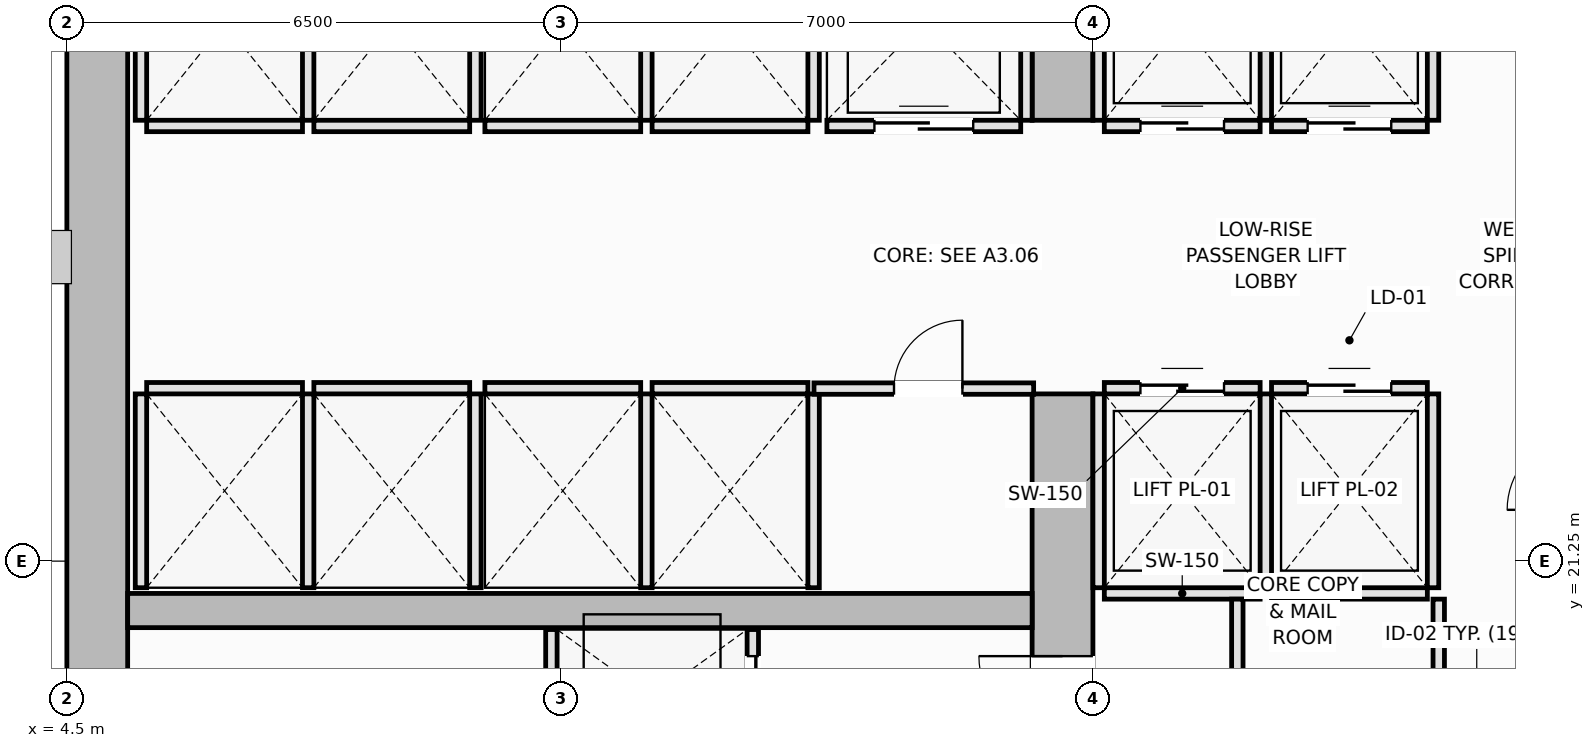
"""IFC4 building model, lengths in metres.
Left out: names, types, materials, properties, quantities, classifications, styles, units other than length and angle.
Written with IfcOpenShell. Run it as: python <this file> out.ifc"""

import sys

from ifc_helpers import new_model, si_unit, direction, frame, frame_2d, origin, place, context, subcontext, project, spatial, rectangle, extrude, element, fill, save


model = new_model("IFC4")
c1 = context("Model", 3, precision=1e-05, world=origin(), true_north=direction((0.0, 1.0)))
c2 = subcontext(c1, "Body", "Model", "MODEL_VIEW")
j1 = project(units=[si_unit("LENGTHUNIT", "METRE"), si_unit("PLANEANGLEUNIT", "RADIAN")], contexts=[c1])
p1 = place(None, origin())
s1 = spatial("IfcSite", under=j1, at=p1, CompositionType="ELEMENT")
p2 = place(p1, origin())
s2 = spatial("IfcBuilding", under=s1, at=p2, CompositionType="ELEMENT")
p3 = place(p2, frame((0.0, 0.0, 64.65)))
s3 = spatial("IfcBuildingStorey", under=s2, at=p3, CompositionType="ELEMENT", Elevation=64.65)
p4 = place(p3, frame((4.9, 14.8, 0.0), z_axis=(0.0, 0.0, 1.0), x_axis=(0.0, 1.0, 0.0)))
e1 = element("IfcWall", 1, at=p4, inside=s3, PredefinedType="SHEAR", context=c2, shape_type="SweptSolid", body=[
    extrude(rectangle(XDim=20.9, YDim=0.8, at=frame_2d((10.45, 0.0))), origin(), (0.0, 0.0, 1.0), 3.55),
])
p5 = place(p3, frame((17.6, 14.8, 0.0), z_axis=(0.0, 0.0, 1.0), x_axis=(0.0, 1.0, 0.0)))
e2 = element("IfcWall", 2, at=p5, inside=s3, PredefinedType="SHEAR", context=c2, shape_type="SweptSolid", body=[
    extrude(rectangle(XDim=8.65, YDim=0.8, at=frame_2d((4.325, 0.0))), origin(), (0.0, 0.0, 1.0), 3.55),
])
p6 = place(p5, frame((4.1, 0.0, 0.0)))
e3 = element("IfcOpeningElement", 3, at=p6, cuts=e2, PredefinedType="OPENING", context=c2, shape_type="SweptSolid", body=[
    extrude(rectangle(XDim=1.1, YDim=2.15, at=frame_2d((0.55, 1.075))), frame((0.0, 0.41, 0.0), z_axis=(0.0, -1.0, 0.0), x_axis=(1.0, 0.0, 0.0)), (0.0, 0.0, 1.0), 0.82),
])
p7 = place(p3, frame((17.6, 27.05, 0.0), z_axis=(0.0, 0.0, 1.0), x_axis=(0.0, 1.0, 0.0)))
e4 = element("IfcWall", 4, at=p7, inside=s3, PredefinedType="SHEAR", context=c2, shape_type="SweptSolid", body=[
    extrude(rectangle(XDim=8.65, YDim=0.8, at=frame_2d((4.325, 0.0))), origin(), (0.0, 0.0, 1.0), 3.55),
])
p8 = place(p7, frame((3.45, 0.0, 0.0)))
e5 = element("IfcOpeningElement", 5, at=p8, cuts=e4, PredefinedType="OPENING", context=c2, shape_type="SweptSolid", body=[
    extrude(rectangle(XDim=1.1, YDim=2.15, at=frame_2d((0.55, 1.075))), frame((0.0, 0.41, 0.0), z_axis=(0.0, -1.0, 0.0), x_axis=(1.0, 0.0, 0.0)), (0.0, 0.0, 1.0), 0.82),
])
p9 = place(p3, frame((5.3, 20.6, 0.0), z_axis=(0.0, 0.0, 1.0), x_axis=(1.0, 0.0, 0.0)))
e6 = element("IfcWall", 6, at=p9, inside=s3, PredefinedType="SHEAR", context=c2, shape_type="SweptSolid", body=[
    extrude(rectangle(XDim=11.9, YDim=0.45, at=frame_2d((5.95, 0.0))), origin(), (0.0, 0.0, 1.0), 3.55),
])
p10 = place(p3, frame((18.15, 20.825, 0.0), z_axis=(0.0, 0.0, 1.0), x_axis=(1.0, 0.0, 0.0)))
e7 = element("IfcWall", 7, at=p10, inside=s3, PredefinedType="PARTITIONING", context=c2, shape_type="SweptSolid", body=[
    extrude(rectangle(XDim=2.05, YDim=0.15, at=frame_2d((1.025, 0.0))), origin(), (0.0, 0.0, 1.0), 3.37),
])
p11 = place(p3, frame((18.15, 23.525, 0.0), z_axis=(0.0, 0.0, 1.0), x_axis=(1.0, 0.0, 0.0)))
e8 = element("IfcWall", 8, at=p11, inside=s3, PredefinedType="PARTITIONING", context=c2, shape_type="SweptSolid", body=[
    extrude(rectangle(XDim=2.05, YDim=0.15, at=frame_2d((1.025, 0.0))), origin(), (0.0, 0.0, 1.0), 3.37),
])
p12 = place(p11, frame((0.475, 0.0, 0.0)))
e9 = element("IfcOpeningElement", 9, at=p12, cuts=e8, PredefinedType="OPENING", context=c2, shape_type="SweptSolid", body=[
    extrude(rectangle(XDim=1.1, YDim=2.2, at=frame_2d((0.55, 1.1))), frame((0.0, 0.085, 0.0), z_axis=(0.0, -1.0, 0.0), x_axis=(1.0, 0.0, 0.0)), (0.0, 0.0, 1.0), 0.17),
])
for number, where, z_axis, x_axis in (
    (10, (18.075, 20.9, 0.0), (0.0, 0.0, 1.0), (0.0, 1.0, 0.0)),
    (11, (20.275, 20.9, 0.0), (0.0, 0.0, 1.0), (0.0, 1.0, 0.0)),
):
    element("IfcWall", number, at=place(p3, frame(where, z_axis=z_axis, x_axis=x_axis)), inside=s3, PredefinedType="PARTITIONING", context=c2, shape_type="SweptSolid", body=[
        extrude(rectangle(XDim=2.55, YDim=0.15, at=frame_2d((1.275, 0.0))), origin(), (0.0, 0.0, 1.0), 3.37),
    ])
p13 = place(p3, frame((20.35, 20.825, 0.0), z_axis=(0.0, 0.0, 1.0), x_axis=(1.0, 0.0, 0.0)))
e12 = element("IfcWall", 12, at=p13, inside=s3, PredefinedType="PARTITIONING", context=c2, shape_type="SweptSolid", body=[
    extrude(rectangle(XDim=2.05, YDim=0.15, at=frame_2d((1.025, 0.0))), origin(), (0.0, 0.0, 1.0), 3.37),
])
p14 = place(p3, frame((20.35, 23.525, 0.0), z_axis=(0.0, 0.0, 1.0), x_axis=(1.0, 0.0, 0.0)))
e13 = element("IfcWall", 13, at=p14, inside=s3, PredefinedType="PARTITIONING", context=c2, shape_type="SweptSolid", body=[
    extrude(rectangle(XDim=2.05, YDim=0.15, at=frame_2d((1.025, 0.0))), origin(), (0.0, 0.0, 1.0), 3.37),
])
p15 = place(p14, frame((0.475, 0.0, 0.0)))
e14 = element("IfcOpeningElement", 14, at=p15, cuts=e13, PredefinedType="OPENING", context=c2, shape_type="SweptSolid", body=[
    extrude(rectangle(XDim=1.1, YDim=2.2, at=frame_2d((0.55, 1.1))), frame((0.0, 0.085, 0.0), z_axis=(0.0, -1.0, 0.0), x_axis=(1.0, 0.0, 0.0)), (0.0, 0.0, 1.0), 0.17),
])
p16 = place(p3, frame((22.475, 20.9, 0.0), z_axis=(0.0, 0.0, 1.0), x_axis=(0.0, 1.0, 0.0)))
e15 = element("IfcWall", 15, at=p16, inside=s3, PredefinedType="PARTITIONING", context=c2, shape_type="SweptSolid", body=[
    extrude(rectangle(XDim=2.55, YDim=0.15, at=frame_2d((1.275, 0.0))), origin(), (0.0, 0.0, 1.0), 3.37),
])
p17 = place(p3, frame((18.15, 26.975, 0.0), z_axis=(0.0, 0.0, 1.0), x_axis=(1.0, 0.0, 0.0)))
e16 = element("IfcWall", 16, at=p17, inside=s3, PredefinedType="PARTITIONING", context=c2, shape_type="SweptSolid", body=[
    extrude(rectangle(XDim=2.05, YDim=0.15, at=frame_2d((1.025, 0.0))), origin(), (0.0, 0.0, 1.0), 3.37),
])
p18 = place(p17, frame((0.475, 0.0, 0.0)))
e17 = element("IfcOpeningElement", 17, at=p18, cuts=e16, PredefinedType="OPENING", context=c2, shape_type="SweptSolid", body=[
    extrude(rectangle(XDim=1.1, YDim=2.2, at=frame_2d((0.55, 1.1))), frame((0.0, 0.085, 0.0), z_axis=(0.0, -1.0, 0.0), x_axis=(1.0, 0.0, 0.0)), (0.0, 0.0, 1.0), 0.17),
])
for number, where, z_axis, x_axis in (
    (18, (18.075, 27.05, 0.0), (0.0, 0.0, 1.0), (0.0, 1.0, 0.0)),
    (19, (20.275, 27.05, 0.0), (0.0, 0.0, 1.0), (0.0, 1.0, 0.0)),
):
    element("IfcWall", number, at=place(p3, frame(where, z_axis=z_axis, x_axis=x_axis)), inside=s3, PredefinedType="PARTITIONING", context=c2, shape_type="SweptSolid", body=[
        extrude(rectangle(XDim=2.55, YDim=0.15, at=frame_2d((1.275, 0.0))), origin(), (0.0, 0.0, 1.0), 3.37),
    ])
p19 = place(p3, frame((20.35, 26.975, 0.0), z_axis=(0.0, 0.0, 1.0), x_axis=(1.0, 0.0, 0.0)))
e20 = element("IfcWall", 20, at=p19, inside=s3, PredefinedType="PARTITIONING", context=c2, shape_type="SweptSolid", body=[
    extrude(rectangle(XDim=2.05, YDim=0.15, at=frame_2d((1.025, 0.0))), origin(), (0.0, 0.0, 1.0), 3.37),
])
p20 = place(p19, frame((0.475, 0.0, 0.0)))
e21 = element("IfcOpeningElement", 21, at=p20, cuts=e20, PredefinedType="OPENING", context=c2, shape_type="SweptSolid", body=[
    extrude(rectangle(XDim=1.1, YDim=2.2, at=frame_2d((0.55, 1.1))), frame((0.0, 0.085, 0.0), z_axis=(0.0, -1.0, 0.0), x_axis=(1.0, 0.0, 0.0)), (0.0, 0.0, 1.0), 0.17),
])
p21 = place(p3, frame((22.475, 27.05, 0.0), z_axis=(0.0, 0.0, 1.0), x_axis=(0.0, 1.0, 0.0)))
e22 = element("IfcWall", 22, at=p21, inside=s3, PredefinedType="PARTITIONING", context=c2, shape_type="SweptSolid", body=[
    extrude(rectangle(XDim=2.55, YDim=0.15, at=frame_2d((1.275, 0.0))), origin(), (0.0, 0.0, 1.0), 3.37),
])
p22 = place(p3, frame((5.55, 23.525, 0.0), z_axis=(0.0, 0.0, 1.0), x_axis=(1.0, 0.0, 0.0)))
e23 = element("IfcWall", 23, at=p22, inside=s3, PredefinedType="PARTITIONING", context=c2, shape_type="SweptSolid", body=[
    extrude(rectangle(XDim=2.05, YDim=0.15, at=frame_2d((1.025, 0.0))), origin(), (0.0, 0.0, 1.0), 3.37),
])
for number, where, z_axis, x_axis in (
    (24, (5.475, 20.9, 0.0), (0.0, 0.0, 1.0), (0.0, 1.0, 0.0)),
    (25, (7.675, 20.9, 0.0), (0.0, 0.0, 1.0), (0.0, 1.0, 0.0)),
):
    element("IfcWall", number, at=place(p3, frame(where, z_axis=z_axis, x_axis=x_axis)), inside=s3, PredefinedType="PARTITIONING", context=c2, shape_type="SweptSolid", body=[
        extrude(rectangle(XDim=2.55, YDim=0.15, at=frame_2d((1.275, 0.0))), origin(), (0.0, 0.0, 1.0), 3.37),
    ])
p23 = place(p3, frame((7.75, 23.525, 0.0), z_axis=(0.0, 0.0, 1.0), x_axis=(1.0, 0.0, 0.0)))
e26 = element("IfcWall", 26, at=p23, inside=s3, PredefinedType="PARTITIONING", context=c2, shape_type="SweptSolid", body=[
    extrude(rectangle(XDim=2.05, YDim=0.15, at=frame_2d((1.025, 0.0))), origin(), (0.0, 0.0, 1.0), 3.37),
])
p24 = place(p3, frame((9.875, 20.9, 0.0), z_axis=(0.0, 0.0, 1.0), x_axis=(0.0, 1.0, 0.0)))
e27 = element("IfcWall", 27, at=p24, inside=s3, PredefinedType="PARTITIONING", context=c2, shape_type="SweptSolid", body=[
    extrude(rectangle(XDim=2.55, YDim=0.15, at=frame_2d((1.275, 0.0))), origin(), (0.0, 0.0, 1.0), 3.37),
])
p25 = place(p3, frame((5.55, 26.975, 0.0), z_axis=(0.0, 0.0, 1.0), x_axis=(1.0, 0.0, 0.0)))
e28 = element("IfcWall", 28, at=p25, inside=s3, PredefinedType="PARTITIONING", context=c2, shape_type="SweptSolid", body=[
    extrude(rectangle(XDim=2.05, YDim=0.15, at=frame_2d((1.025, 0.0))), origin(), (0.0, 0.0, 1.0), 3.37),
])
for number, where, z_axis, x_axis in (
    (29, (5.475, 27.05, 0.0), (0.0, 0.0, 1.0), (0.0, 1.0, 0.0)),
    (30, (7.675, 27.05, 0.0), (0.0, 0.0, 1.0), (0.0, 1.0, 0.0)),
):
    element("IfcWall", number, at=place(p3, frame(where, z_axis=z_axis, x_axis=x_axis)), inside=s3, PredefinedType="PARTITIONING", context=c2, shape_type="SweptSolid", body=[
        extrude(rectangle(XDim=2.55, YDim=0.15, at=frame_2d((1.275, 0.0))), origin(), (0.0, 0.0, 1.0), 3.37),
    ])
p26 = place(p3, frame((7.75, 26.975, 0.0), z_axis=(0.0, 0.0, 1.0), x_axis=(1.0, 0.0, 0.0)))
e31 = element("IfcWall", 31, at=p26, inside=s3, PredefinedType="PARTITIONING", context=c2, shape_type="SweptSolid", body=[
    extrude(rectangle(XDim=2.05, YDim=0.15, at=frame_2d((1.025, 0.0))), origin(), (0.0, 0.0, 1.0), 3.37),
])
p27 = place(p3, frame((9.875, 27.05, 0.0), z_axis=(0.0, 0.0, 1.0), x_axis=(0.0, 1.0, 0.0)))
e32 = element("IfcWall", 32, at=p27, inside=s3, PredefinedType="PARTITIONING", context=c2, shape_type="SweptSolid", body=[
    extrude(rectangle(XDim=2.55, YDim=0.15, at=frame_2d((1.275, 0.0))), origin(), (0.0, 0.0, 1.0), 3.37),
])
p28 = place(p3, frame((10.0, 23.525, 0.0), z_axis=(0.0, 0.0, 1.0), x_axis=(1.0, 0.0, 0.0)))
e33 = element("IfcWall", 33, at=p28, inside=s3, PredefinedType="PARTITIONING", context=c2, shape_type="SweptSolid", body=[
    extrude(rectangle(XDim=2.05, YDim=0.15, at=frame_2d((1.025, 0.0))), origin(), (0.0, 0.0, 1.0), 3.37),
])
p29 = place(p3, frame((12.125, 20.9, 0.0), z_axis=(0.0, 0.0, 1.0), x_axis=(0.0, 1.0, 0.0)))
e34 = element("IfcWall", 34, at=p29, inside=s3, PredefinedType="PARTITIONING", context=c2, shape_type="SweptSolid", body=[
    extrude(rectangle(XDim=2.55, YDim=0.15, at=frame_2d((1.275, 0.0))), origin(), (0.0, 0.0, 1.0), 3.37),
])
p30 = place(p3, frame((12.2, 23.525, 0.0), z_axis=(0.0, 0.0, 1.0), x_axis=(1.0, 0.0, 0.0)))
e35 = element("IfcWall", 35, at=p30, inside=s3, PredefinedType="PARTITIONING", context=c2, shape_type="SweptSolid", body=[
    extrude(rectangle(XDim=2.05, YDim=0.15, at=frame_2d((1.025, 0.0))), origin(), (0.0, 0.0, 1.0), 3.37),
])
p31 = place(p3, frame((14.325, 20.9, 0.0), z_axis=(0.0, 0.0, 1.0), x_axis=(0.0, 1.0, 0.0)))
e36 = element("IfcWall", 36, at=p31, inside=s3, PredefinedType="PARTITIONING", context=c2, shape_type="SweptSolid", body=[
    extrude(rectangle(XDim=2.55, YDim=0.15, at=frame_2d((1.275, 0.0))), origin(), (0.0, 0.0, 1.0), 3.37),
])
p32 = place(p3, frame((10.0, 26.975, 0.0), z_axis=(0.0, 0.0, 1.0), x_axis=(1.0, 0.0, 0.0)))
e37 = element("IfcWall", 37, at=p32, inside=s3, PredefinedType="PARTITIONING", context=c2, shape_type="SweptSolid", body=[
    extrude(rectangle(XDim=2.05, YDim=0.15, at=frame_2d((1.025, 0.0))), origin(), (0.0, 0.0, 1.0), 3.37),
])
p33 = place(p3, frame((12.125, 27.05, 0.0), z_axis=(0.0, 0.0, 1.0), x_axis=(0.0, 1.0, 0.0)))
e38 = element("IfcWall", 38, at=p33, inside=s3, PredefinedType="PARTITIONING", context=c2, shape_type="SweptSolid", body=[
    extrude(rectangle(XDim=2.55, YDim=0.15, at=frame_2d((1.275, 0.0))), origin(), (0.0, 0.0, 1.0), 3.37),
])
p34 = place(p3, frame((12.2, 26.975, 0.0), z_axis=(0.0, 0.0, 1.0), x_axis=(1.0, 0.0, 0.0)))
e39 = element("IfcWall", 39, at=p34, inside=s3, PredefinedType="PARTITIONING", context=c2, shape_type="SweptSolid", body=[
    extrude(rectangle(XDim=2.05, YDim=0.15, at=frame_2d((1.025, 0.0))), origin(), (0.0, 0.0, 1.0), 3.37),
])
p35 = place(p3, frame((14.325, 27.05, 0.0), z_axis=(0.0, 0.0, 1.0), x_axis=(0.0, 1.0, 0.0)))
e40 = element("IfcWall", 40, at=p35, inside=s3, PredefinedType="PARTITIONING", context=c2, shape_type="SweptSolid", body=[
    extrude(rectangle(XDim=2.55, YDim=0.15, at=frame_2d((1.275, 0.0))), origin(), (0.0, 0.0, 1.0), 3.37),
])
p36 = place(p3, frame((14.5, 26.975, 0.0), z_axis=(0.0, 0.0, 1.0), x_axis=(1.0, 0.0, 0.0)))
e41 = element("IfcWall", 41, at=p36, inside=s3, PredefinedType="PARTITIONING", context=c2, shape_type="SweptSolid", body=[
    extrude(rectangle(XDim=2.55, YDim=0.15, at=frame_2d((1.275, 0.0))), origin(), (0.0, 0.0, 1.0), 3.37),
])
p37 = place(p36, frame((0.625, 0.0, 0.0)))
e42 = element("IfcOpeningElement", 42, at=p37, cuts=e41, PredefinedType="OPENING", context=c2, shape_type="SweptSolid", body=[
    extrude(rectangle(XDim=1.3, YDim=2.2, at=frame_2d((0.65, 1.1))), frame((0.0, 0.085, 0.0), z_axis=(0.0, -1.0, 0.0), x_axis=(1.0, 0.0, 0.0)), (0.0, 0.0, 1.0), 0.17),
])
p38 = place(p3, frame((17.125, 27.05, 0.0), z_axis=(0.0, 0.0, 1.0), x_axis=(0.0, 1.0, 0.0)))
e43 = element("IfcWall", 43, at=p38, inside=s3, PredefinedType="PARTITIONING", context=c2, shape_type="SweptSolid", body=[
    extrude(rectangle(XDim=2.6, YDim=0.15, at=frame_2d((1.3, 0.0))), origin(), (0.0, 0.0, 1.0), 3.37),
])
p39 = place(p3, frame((10.875, 18.55, 0.0), z_axis=(0.0, 0.0, 1.0), x_axis=(0.0, 1.0, 0.0)))
e44 = element("IfcWall", 44, at=p39, inside=s3, PredefinedType="PARTITIONING", context=c2, shape_type="SweptSolid", body=[
    extrude(rectangle(XDim=1.8, YDim=0.15, at=frame_2d((0.9, 0.0))), origin(), (0.0, 0.0, 1.0), 3.37),
])
p40 = place(p3, frame((13.525, 18.55, 0.0), z_axis=(0.0, 0.0, 1.0), x_axis=(0.0, 1.0, 0.0)))
e45 = element("IfcWall", 45, at=p40, inside=s3, PredefinedType="PARTITIONING", context=c2, shape_type="SweptSolid", body=[
    extrude(rectangle(XDim=1.8, YDim=0.15, at=frame_2d((0.9, 0.0))), origin(), (0.0, 0.0, 1.0), 3.37),
])
p41 = place(p40, frame((0.35, 0.0, 0.0)))
e46 = element("IfcOpeningElement", 46, at=p41, cuts=e45, PredefinedType="OPENING", context=c2, shape_type="SweptSolid", body=[
    extrude(rectangle(XDim=1.1, YDim=2.2, at=frame_2d((0.55, 1.1))), frame((0.0, 0.085, 0.0), z_axis=(0.0, -1.0, 0.0), x_axis=(1.0, 0.0, 0.0)), (0.0, 0.0, 1.0), 0.17),
])
p42 = place(p3, frame((14.33, 23.52, 0.0), z_axis=(0.0, 0.0, 1.0), x_axis=(1.0, 0.0, 0.0)))
e47 = element("IfcWall", 47, at=p42, inside=s3, PredefinedType="PARTITIONING", context=c2, shape_type="SweptSolid", body=[
    extrude(rectangle(XDim=2.89, YDim=0.15, at=frame_2d((1.445, 0.0))), origin(), (0.0, 0.0, 1.0), 3.37),
])
p43 = place(p42, frame((1.053, 0.0, 0.0)))
e48 = element("IfcOpeningElement", 48, at=p43, cuts=e47, PredefinedType="OPENING", context=c2, shape_type="SweptSolid", body=[
    extrude(rectangle(XDim=0.9, YDim=2.1, at=frame_2d((0.45, 1.05))), frame((0.0, 0.085, 0.0), z_axis=(0.0, -1.0, 0.0), x_axis=(1.0, 0.0, 0.0)), (0.0, 0.0, 1.0), 0.17),
])
p44 = place(p3, frame((22.55, 16.5, 0.0), z_axis=(0.0, 0.0, 1.0), x_axis=(0.0, 1.0, 0.0)))
e49 = element("IfcWall", 49, at=p44, inside=s3, PredefinedType="PARTITIONING", context=c2, shape_type="SweptSolid", body=[
    extrude(rectangle(XDim=4.25, YDim=0.15, at=frame_2d((2.125, 0.0))), origin(), (0.0, 0.0, 1.0), 3.01),
])
p45 = place(p44, frame((1.625, 0.0, 0.0)))
e50 = element("IfcOpeningElement", 50, at=p45, cuts=e49, PredefinedType="OPENING", context=c2, shape_type="SweptSolid", body=[
    extrude(rectangle(XDim=1.0, YDim=2.15, at=frame_2d((0.5, 1.075))), frame((0.0, 0.085, 0.0), z_axis=(0.0, -1.0, 0.0), x_axis=(1.0, 0.0, 0.0)), (0.0, 0.0, 1.0), 0.17),
])
p46 = place(p3, frame((19.9, 16.5, 0.0), z_axis=(0.0, 0.0, 1.0), x_axis=(0.0, 1.0, 0.0)))
e51 = element("IfcWall", 51, at=p46, inside=s3, PredefinedType="PARTITIONING", context=c2, shape_type="SweptSolid", body=[
    extrude(rectangle(XDim=4.25, YDim=0.15, at=frame_2d((2.125, 0.0))), origin(), (0.0, 0.0, 1.0), 3.37),
])
p47 = place(p12, origin())
e52 = element("IfcDoor", 52, at=p47, inside=s3, OperationType="DOUBLE_DOOR_SLIDING", PredefinedType="DOOR", context=c2, shape_type="SweptSolid", body=[
    extrude(rectangle(XDim=1.1, YDim=2.2, at=frame_2d((0.55, 1.1))), frame((0.0, 0.025, 0.0), z_axis=(0.0, -1.0, 0.0), x_axis=(1.0, 0.0, 0.0)), (0.0, 0.0, 1.0), 0.05),
])
fill(e9, e52)
p48 = place(p15, origin())
e53 = element("IfcDoor", 53, at=p48, inside=s3, OperationType="DOUBLE_DOOR_SLIDING", PredefinedType="DOOR", context=c2, shape_type="SweptSolid", body=[
    extrude(rectangle(XDim=1.1, YDim=2.2, at=frame_2d((0.55, 1.1))), frame((0.0, 0.025, 0.0), z_axis=(0.0, -1.0, 0.0), x_axis=(1.0, 0.0, 0.0)), (0.0, 0.0, 1.0), 0.05),
])
fill(e14, e53)
p49 = place(p18, origin())
e54 = element("IfcDoor", 54, at=p49, inside=s3, OperationType="DOUBLE_DOOR_SLIDING", PredefinedType="DOOR", context=c2, shape_type="SweptSolid", body=[
    extrude(rectangle(XDim=1.1, YDim=2.2, at=frame_2d((0.55, 1.1))), frame((0.0, 0.025, 0.0), z_axis=(0.0, -1.0, 0.0), x_axis=(1.0, 0.0, 0.0)), (0.0, 0.0, 1.0), 0.05),
])
fill(e17, e54)
p50 = place(p20, origin())
e55 = element("IfcDoor", 55, at=p50, inside=s3, OperationType="DOUBLE_DOOR_SLIDING", PredefinedType="DOOR", context=c2, shape_type="SweptSolid", body=[
    extrude(rectangle(XDim=1.1, YDim=2.2, at=frame_2d((0.55, 1.1))), frame((0.0, 0.025, 0.0), z_axis=(0.0, -1.0, 0.0), x_axis=(1.0, 0.0, 0.0)), (0.0, 0.0, 1.0), 0.05),
])
fill(e21, e55)
p51 = place(p37, origin())
e56 = element("IfcDoor", 56, at=p51, inside=s3, OperationType="DOUBLE_DOOR_SLIDING", PredefinedType="DOOR", context=c2, shape_type="SweptSolid", body=[
    extrude(rectangle(XDim=1.3, YDim=2.2, at=frame_2d((0.65, 1.1))), frame((0.0, 0.025, 0.0), z_axis=(0.0, -1.0, 0.0), x_axis=(1.0, 0.0, 0.0)), (0.0, 0.0, 1.0), 0.05),
])
fill(e42, e56)
p52 = place(p41, origin())
e57 = element("IfcDoor", 57, at=p52, inside=s3, OperationType="DOUBLE_DOOR_SLIDING", PredefinedType="DOOR", context=c2, shape_type="SweptSolid", body=[
    extrude(rectangle(XDim=1.1, YDim=2.2, at=frame_2d((0.55, 1.1))), frame((0.0, 0.025, 0.0), z_axis=(0.0, -1.0, 0.0), x_axis=(1.0, 0.0, 0.0)), (0.0, 0.0, 1.0), 0.05),
])
fill(e46, e57)
p53 = place(p6, origin())
e58 = element("IfcDoor", 58, at=p53, inside=s3, OperationType="SINGLE_SWING_RIGHT", PredefinedType="DOOR", context=c2, shape_type="SweptSolid", body=[
    extrude(rectangle(XDim=1.1, YDim=2.15, at=frame_2d((0.55, 1.075))), frame((0.0, 0.025, 0.0), z_axis=(0.0, -1.0, 0.0), x_axis=(1.0, 0.0, 0.0)), (0.0, 0.0, 1.0), 0.05),
])
fill(e3, e58)
p54 = place(p43, origin())
e59 = element("IfcDoor", 59, at=p54, inside=s3, OperationType="SINGLE_SWING_RIGHT", PredefinedType="DOOR", context=c2, shape_type="SweptSolid", body=[
    extrude(rectangle(XDim=0.9, YDim=2.1, at=frame_2d((0.45, 1.05))), frame((0.0, 0.025, 0.0), z_axis=(0.0, -1.0, 0.0), x_axis=(1.0, 0.0, 0.0)), (0.0, 0.0, 1.0), 0.05),
])
fill(e48, e59)
save(model, sys.argv[1])
